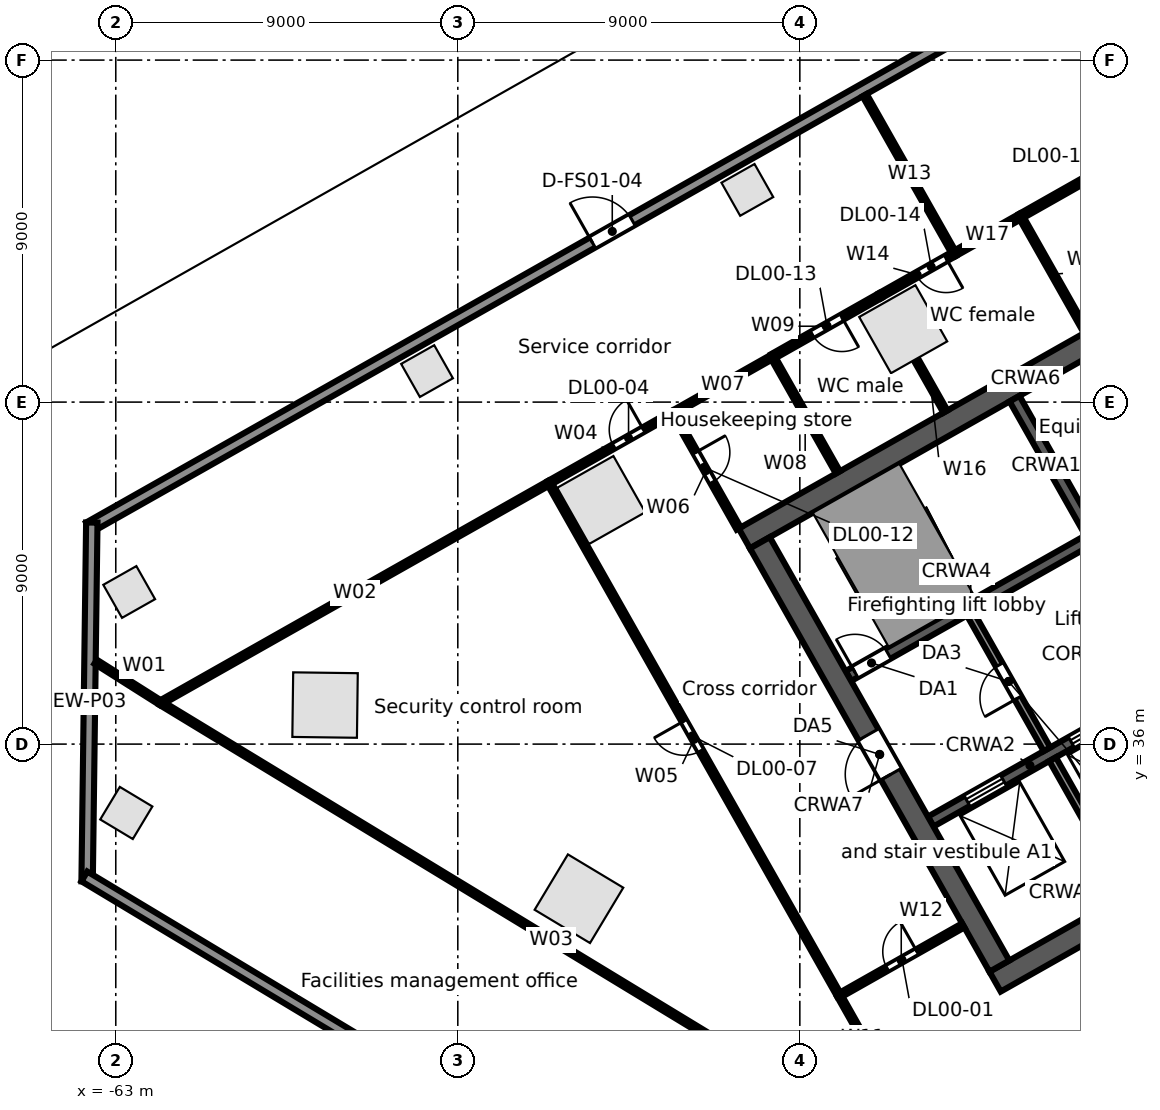
"""IFC4 building model, lengths in metres.
Left out: names, types, materials, properties, quantities, classifications, styles, units other than length and angle.
Written with IfcOpenShell. Run it as: python <this file> out.ifc"""

import sys

from ifc_helpers import new_model, si_unit, direction, frame, frame_2d, origin, origin_2d, place, context, subcontext, project, spatial, rectangle, extrude, element, fill, save


model = new_model("IFC4")
c1 = context("Model", 3, precision=1e-05, world=origin(), true_north=direction((0.0, 1.0)))
c2 = subcontext(c1, "Body", "Model", "MODEL_VIEW")
j1 = project(units=[si_unit("LENGTHUNIT", "METRE"), si_unit("PLANEANGLEUNIT", "RADIAN")], contexts=[c1])
p1 = place(None, origin())
s1 = spatial("IfcSite", under=j1, at=p1, CompositionType="ELEMENT")
p2 = place(p1, origin())
s2 = spatial("IfcBuilding", under=s1, at=p2, CompositionType="ELEMENT")
p3 = place(p2, origin())
s3 = spatial("IfcBuildingStorey", under=s2, at=p3, CompositionType="ELEMENT", Elevation=0.0)
for number, where, z_axis, x_axis in (
    (1, (-42.28, 46.919, 0.0), (0.0, 0.0, 1.0), (-0.87, -0.492, 0.0)),
    (2, (-50.226, 42.423, 0.0), (0.0, 0.0, 1.0), (-0.87, -0.492, 0.0)),
    (3, (-57.493, 37.027, 0.0), (0.0, 0.0, 1.0), (-0.013, -1.0, 0.0)),
    (4, (-50.812, 31.931, 0.0), (0.0, 0.0, 1.0), (0.857, -0.515, 0.0)),
):
    element("IfcColumn", number, at=place(p3, frame(where, z_axis=z_axis, x_axis=x_axis)), inside=s3, PredefinedType="COLUMN", context=c2, shape_type="SweptSolid", body=[
        extrude(rectangle(XDim=1.7, YDim=1.7, at=origin_2d()), origin(), (0.0, 0.0, 1.0), 6.5),
    ])
for number, where, z_axis, x_axis in (
    (5, (-46.381, 50.584, 0.0), (0.0, 0.0, 1.0), (-0.87, -0.492, 0.0)),
    (6, (-54.81, 45.816, 0.0), (0.0, 0.0, 1.0), (-0.87, -0.492, 0.0)),
    (7, (-62.647, 40.003, 0.0), (0.0, 0.0, 1.0), (-0.87, -0.492, 0.0)),
    (8, (-62.723, 34.188, 0.0), (0.0, 0.0, 1.0), (0.857, -0.515, 0.0)),
):
    element("IfcColumn", number, at=place(p3, frame(where, z_axis=z_axis, x_axis=x_axis)), inside=s3, PredefinedType="COLUMN", context=c2, shape_type="SweptSolid", body=[
        extrude(rectangle(XDim=1.0, YDim=1.0, at=origin_2d()), origin(), (0.0, 0.0, 1.0), 6.5),
    ])
p4 = place(p3, frame((-63.707, 41.701, 0.0), z_axis=(0.0, 0.0, 1.0), x_axis=(0.870355510268, 0.492423888277, 0.0)))
e9 = element("IfcWall", 9, at=p4, inside=s3, PredefinedType="STANDARD", context=c2, shape_type="SweptSolid", body=[
    extrude(rectangle(XDim=67.903, YDim=0.3, at=frame_2d((33.952, 0.0))), origin(), (0.0, 0.0, 1.0), 6.15),
])
p5 = place(p4, frame((44.274, 0.0, 0.0)))
e10 = element("IfcOpeningElement", 10, at=p5, cuts=e9, PredefinedType="OPENING", context=c2, shape_type="SweptSolid", body=[
    extrude(rectangle(XDim=1.2, YDim=2.4, at=frame_2d((0.6, 1.2))), frame((0.0, 0.16, 0.0), z_axis=(0.0, -1.0, 0.0), x_axis=(1.0, 0.0, 0.0)), (0.0, 0.0, 1.0), 0.32),
])
p6 = place(p4, frame((15.222, 0.0, 0.0)))
e11 = element("IfcOpeningElement", 11, at=p6, cuts=e9, PredefinedType="OPENING", context=c2, shape_type="SweptSolid", body=[
    extrude(rectangle(XDim=1.2, YDim=2.4, at=frame_2d((0.6, 1.2))), frame((0.0, 0.16, 0.0), z_axis=(0.0, -1.0, 0.0), x_axis=(1.0, 0.0, 0.0)), (0.0, 0.0, 1.0), 0.32),
])
p7 = place(p3, frame((-63.754, 32.387, 0.0), z_axis=(0.0, 0.0, 1.0), x_axis=(0.013081929375, 0.999914427901, 0.0)))
e12 = element("IfcWall", 12, at=p7, inside=s3, PredefinedType="STANDARD", context=c2, shape_type="SweptSolid", body=[
    extrude(rectangle(XDim=9.443, YDim=0.3, at=frame_2d((4.722, 0.0))), origin(), (0.0, 0.0, 1.0), 6.15),
])
p8 = place(p3, frame((-45.526, 21.522, 0.0), z_axis=(0.0, 0.0, 1.0), x_axis=(-0.857164837164, 0.515042174903, 0.0)))
e13 = element("IfcWall", 13, at=p8, inside=s3, PredefinedType="STANDARD", context=c2, shape_type="SweptSolid", body=[
    extrude(rectangle(XDim=21.35, YDim=0.3, at=frame_2d((10.675, 0.0))), origin(), (0.0, 0.0, 1.0), 6.15),
])
p9 = place(p3, frame((-39.862, 29.749, 0.0), z_axis=(0.0, 0.0, 1.0), x_axis=(0.870350116061, 0.492433422375, 0.0)))
e14 = element("IfcWall", 14, at=p9, inside=s3, PredefinedType="SOLIDWALL", context=c2, shape_type="SweptSolid", body=[
    extrude(rectangle(XDim=17.0, YDim=0.6, at=frame_2d((8.5, 0.0))), origin(), (0.0, 0.0, 1.0), 6.15),
])
p10 = place(p9, frame((7.2, 0.0, 0.0)))
e15 = element("IfcOpeningElement", 15, at=p10, cuts=e14, PredefinedType="OPENING", context=c2, shape_type="SweptSolid", body=[
    extrude(rectangle(XDim=1.2, YDim=2.1, at=frame_2d((0.6, 1.05))), frame((0.0, 0.31, 0.0), z_axis=(0.0, -1.0, 0.0), x_axis=(1.0, 0.0, 0.0)), (0.0, 0.0, 1.0), 0.62),
])
p11 = place(p3, frame((-41.556, 33.961, 0.0), z_axis=(0.0, 0.0, 1.0), x_axis=(0.870343731308, 0.492444706919, 0.0)))
e16 = element("IfcWall", 16, at=p11, inside=s3, PredefinedType="SOLIDWALL", context=c2, shape_type="SweptSolid", body=[
    extrude(rectangle(XDim=6.0, YDim=0.3, at=frame_2d((3.0, 0.0))), origin(), (0.0, 0.0, 1.0), 6.15),
])
p12 = place(p11, frame((1.1, 0.0, 0.0)))
e17 = element("IfcOpeningElement", 17, at=p12, cuts=e16, PredefinedType="OPENING", context=c2, shape_type="SweptSolid", body=[
    extrude(rectangle(XDim=1.1, YDim=2.1, at=frame_2d((0.55, 1.05))), frame((0.0, 0.16, 0.0), z_axis=(0.0, -1.0, 0.0), x_axis=(1.0, 0.0, 0.0)), (0.0, 0.0, 1.0), 0.32),
])
p13 = place(p11, frame((4.25, 0.0, 0.0)))
e18 = element("IfcOpeningElement", 18, at=p13, cuts=e16, PredefinedType="OPENING", context=c2, shape_type="SweptSolid", body=[
    extrude(rectangle(XDim=1.1, YDim=2.1, at=frame_2d((0.55, 1.05))), frame((0.0, 0.16, 0.0), z_axis=(0.0, -1.0, 0.0), x_axis=(1.0, 0.0, 0.0)), (0.0, 0.0, 1.0), 0.32),
])
p14 = place(p3, frame((-43.723, 37.791, 0.0), z_axis=(0.0, 0.0, 1.0), x_axis=(0.87035077051, 0.49243226567, 0.0)))
e19 = element("IfcWall", 19, at=p14, inside=s3, PredefinedType="SOLIDWALL", context=c2, shape_type="SweptSolid", body=[
    extrude(rectangle(XDim=7.4, YDim=0.3, at=frame_2d((3.7, 0.0))), origin(), (0.0, 0.0, 1.0), 6.15),
])
p15 = place(p14, frame((0.2, 0.0, 0.0)))
e20 = element("IfcOpeningElement", 20, at=p15, cuts=e19, PredefinedType="OPENING", context=c2, shape_type="SweptSolid", body=[
    extrude(rectangle(XDim=1.0, YDim=2.1, at=frame_2d((0.5, 1.05))), frame((0.0, 0.16, 0.0), z_axis=(0.0, -1.0, 0.0), x_axis=(1.0, 0.0, 0.0)), (0.0, 0.0, 1.0), 0.32),
])
p16 = place(p3, frame((-46.461, 41.412, 0.0), z_axis=(0.0, 0.0, 1.0), x_axis=(0.870350116061, 0.492433422375, 0.0)))
e21 = element("IfcWall", 21, at=p16, inside=s3, PredefinedType="SOLIDWALL", context=c2, shape_type="SweptSolid", body=[
    extrude(rectangle(XDim=17.0, YDim=0.6, at=frame_2d((8.5, 0.0))), origin(), (0.0, 0.0, 1.0), 6.15),
])
p17 = place(p3, frame((-46.052, 41.298, 0.0), z_axis=(0.0, 0.0, 1.0), x_axis=(0.492418598281, -0.870358503186, 0.0)))
e22 = element("IfcWall", 22, at=p17, inside=s3, PredefinedType="SOLIDWALL", context=c2, shape_type="SweptSolid", body=[
    extrude(rectangle(XDim=12.8, YDim=0.6, at=frame_2d((6.4, 0.0))), origin(), (0.0, 0.0, 1.0), 6.15),
])
p18 = place(p17, frame((5.8, 0.0, 0.0)))
e23 = element("IfcOpeningElement", 23, at=p18, cuts=e22, PredefinedType="OPENING", context=c2, shape_type="SweptSolid", body=[
    extrude(rectangle(XDim=1.2, YDim=2.1, at=frame_2d((0.6, 1.05))), frame((0.0, 0.31, 0.0), z_axis=(0.0, -1.0, 0.0), x_axis=(1.0, 0.0, 0.0)), (0.0, 0.0, 1.0), 0.62),
])
p19 = place(p3, frame((-38.349, 35.603, 0.0), z_axis=(0.0, 0.0, 1.0), x_axis=(0.49241474071, -0.870360685654, 0.0)))
e24 = element("IfcWall", 24, at=p19, inside=s3, PredefinedType="SOLIDWALL", context=c2, shape_type="SweptSolid", body=[
    extrude(rectangle(XDim=4.05, YDim=0.2, at=frame_2d((2.025, 0.0))), origin(), (0.0, 0.0, 1.0), 6.15),
])
p20 = place(p3, frame((-40.516, 39.433, 0.0), z_axis=(0.0, 0.0, 1.0), x_axis=(0.492453559952, -0.87033872216, 0.0)))
e25 = element("IfcWall", 25, at=p20, inside=s3, PredefinedType="PARTITIONING", context=c2, shape_type="SweptSolid", body=[
    extrude(rectangle(XDim=4.1, YDim=0.2, at=frame_2d((2.05, 0.0))), origin(), (0.0, 0.0, 1.0), 6.15),
])
p21 = place(p20, frame((1.55, 0.0, 0.0)))
e26 = element("IfcOpeningElement", 26, at=p21, cuts=e25, PredefinedType="OPENING", context=c2, shape_type="SweptSolid", body=[
    extrude(rectangle(XDim=1.0, YDim=2.1, at=frame_2d((0.5, 1.05))), frame((0.0, 0.11, 0.0), z_axis=(0.0, -1.0, 0.0), x_axis=(1.0, 0.0, 0.0)), (0.0, 0.0, 1.0), 0.22),
])
p22 = place(p3, frame((-39.35, 45.09, 0.0), z_axis=(0.0, 0.0, 1.0), x_axis=(0.49241474071, -0.870360685654, 0.0)))
e27 = element("IfcWall", 27, at=p22, inside=s3, PredefinedType="SOLIDWALL", context=c2, shape_type="SweptSolid", body=[
    extrude(rectangle(XDim=4.05, YDim=0.3, at=frame_2d((2.025, 0.0))), origin(), (0.0, 0.0, 1.0), 6.15),
])
p23 = place(p3, frame((-63.529, 38.167, 0.0), z_axis=(0.0, 0.0, 1.0), x_axis=(0.844913795328, -0.534902494352, 0.0)))
e28 = element("IfcWall", 28, at=p23, inside=s3, PredefinedType="PARTITIONING", context=c2, shape_type="SweptSolid", body=[
    extrude(rectangle(XDim=2.019, YDim=0.125, at=frame_2d((1.01, 0.0))), origin(), (0.0, 0.0, 1.0), 5.63),
])
p24 = place(p3, frame((-61.823, 37.087, 0.0), z_axis=(0.0, 0.0, 1.0), x_axis=(0.870357669928, 0.492420071074, 0.0)))
e29 = element("IfcWall", 29, at=p24, inside=s3, PredefinedType="PARTITIONING", context=c2, shape_type="SweptSolid", body=[
    extrude(rectangle(XDim=11.75, YDim=0.125, at=frame_2d((5.875, 0.0))), origin(), (0.0, 0.0, 1.0), 5.33),
])
p25 = place(p3, frame((-61.823, 37.087, 0.0), z_axis=(0.0, 0.0, 1.0), x_axis=(0.854710834679, -0.519104410579, 0.0)))
e30 = element("IfcWall", 30, at=p25, inside=s3, PredefinedType="PARTITIONING", context=c2, shape_type="SweptSolid", body=[
    extrude(rectangle(XDim=24.064, YDim=0.125, at=frame_2d((12.032, 0.0))), origin(), (0.0, 0.0, 1.0), 5.212),
])
p26 = place(p3, frame((-51.596, 42.873, 0.0), z_axis=(0.0, 0.0, 1.0), x_axis=(0.87043427122, 0.492284652905, 0.0)))
e31 = element("IfcWall", 31, at=p26, inside=s3, PredefinedType="PARTITIONING", context=c2, shape_type="SweptSolid", body=[
    extrude(rectangle(XDim=3.75, YDim=0.125, at=frame_2d((1.875, 0.0))), origin(), (0.0, 0.0, 1.0), 6.15),
])
p27 = place(p26, frame((1.95, 0.0, 0.0)))
e32 = element("IfcOpeningElement", 32, at=p27, cuts=e31, PredefinedType="OPENING", context=c2, shape_type="SweptSolid", body=[
    extrude(rectangle(XDim=0.9, YDim=2.1, at=frame_2d((0.45, 1.05))), frame((0.0, 0.073, 0.0), z_axis=(0.0, -1.0, 0.0), x_axis=(1.0, 0.0, 0.0)), (0.0, 0.0, 1.0), 0.145),
])
p28 = place(p3, frame((-51.596, 42.873, 0.0), z_axis=(0.0, 0.0, 1.0), x_axis=(0.492435038471, -0.870349201692, 0.0)))
e33 = element("IfcWall", 33, at=p28, inside=s3, PredefinedType="PARTITIONING", context=c2, shape_type="SweptSolid", body=[
    extrude(rectangle(XDim=15.501, YDim=0.125, at=frame_2d((7.75, 0.0))), origin(), (0.0, 0.0, 1.0), 5.212),
])
p29 = place(p28, frame((7.2, 0.0, 0.0)))
e34 = element("IfcOpeningElement", 34, at=p29, cuts=e33, PredefinedType="OPENING", context=c2, shape_type="SweptSolid", body=[
    extrude(rectangle(XDim=0.9, YDim=2.1, at=frame_2d((0.45, 1.05))), frame((0.0, 0.073, 0.0), z_axis=(0.0, -1.0, 0.0), x_axis=(1.0, 0.0, 0.0)), (0.0, 0.0, 1.0), 0.145),
])
p30 = place(p3, frame((-48.332, 44.719, 0.0), z_axis=(0.0, 0.0, 1.0), x_axis=(0.492392845909, -0.87037307248, 0.0)))
e35 = element("IfcWall", 35, at=p30, inside=s3, PredefinedType="PARTITIONING", context=c2, shape_type="SweptSolid", body=[
    extrude(rectangle(XDim=3.5, YDim=0.125, at=frame_2d((1.75, 0.0))), origin(), (0.0, 0.0, 1.0), 5.43),
])
p31 = place(p30, frame((1.2, 0.0, 0.0)))
e36 = element("IfcOpeningElement", 36, at=p31, cuts=e35, PredefinedType="OPENING", context=c2, shape_type="SweptSolid", body=[
    extrude(rectangle(XDim=0.9, YDim=2.1, at=frame_2d((0.45, 1.05))), frame((0.0, 0.073, 0.0), z_axis=(0.0, -1.0, 0.0), x_axis=(1.0, 0.0, 0.0)), (0.0, 0.0, 1.0), 0.145),
])
p32 = place(p3, frame((-48.332, 44.719, 0.0), z_axis=(0.0, 0.0, 1.0), x_axis=(0.870388475779, 0.492365617434, 0.0)))
e37 = element("IfcWall", 37, at=p32, inside=s3, PredefinedType="PARTITIONING", context=c2, shape_type="SweptSolid", body=[
    extrude(rectangle(XDim=3.0, YDim=0.125, at=frame_2d((1.5, 0.0))), origin(), (0.0, 0.0, 1.0), 6.15),
])
p33 = place(p3, frame((-45.721, 46.196, 0.0), z_axis=(0.0, 0.0, 1.0), x_axis=(0.492310098002, -0.870419879946, 0.0)))
e38 = element("IfcWall", 38, at=p33, inside=s3, PredefinedType="PARTITIONING", context=c2, shape_type="SweptSolid", body=[
    extrude(rectangle(XDim=3.5, YDim=0.125, at=frame_2d((1.75, 0.0))), origin(), (0.0, 0.0, 1.0), 5.43),
])
p34 = place(p3, frame((-45.721, 46.196, 0.0), z_axis=(0.0, 0.0, 1.0), x_axis=(0.870278724491, 0.492559581877, 0.0)))
e39 = element("IfcWall", 39, at=p34, inside=s3, PredefinedType="PARTITIONING", context=c2, shape_type="SweptSolid", body=[
    extrude(rectangle(XDim=3.25, YDim=0.15, at=frame_2d((1.625, 0.0))), origin(), (0.0, 0.0, 1.0), 5.53),
])
p35 = place(p34, frame((1.2, 0.0, 0.0)))
e40 = element("IfcOpeningElement", 40, at=p35, cuts=e39, PredefinedType="OPENING", context=c2, shape_type="SweptSolid", body=[
    extrude(rectangle(XDim=0.9, YDim=2.1, at=frame_2d((0.45, 1.05))), frame((0.0, 0.085, 0.0), z_axis=(0.0, -1.0, 0.0), x_axis=(1.0, 0.0, 0.0)), (0.0, 0.0, 1.0), 0.17),
])
p36 = place(p3, frame((-43.963, 29.382, 0.0), z_axis=(0.0, 0.0, 1.0), x_axis=(0.492408705769, -0.870364099951, 0.0)))
e41 = element("IfcWall", 41, at=p36, inside=s3, PredefinedType="PARTITIONING", context=c2, shape_type="SweptSolid", body=[
    extrude(rectangle(XDim=2.541, YDim=0.125, at=frame_2d((1.27, 0.0))), origin(), (0.0, 0.0, 1.0), 5.43),
])
p37 = place(p3, frame((-43.963, 29.382, 0.0), z_axis=(0.0, 0.0, 1.0), x_axis=(0.870259488443, 0.492593567533, 0.0)))
e42 = element("IfcWall", 42, at=p37, inside=s3, PredefinedType="PARTITIONING", context=c2, shape_type="SweptSolid", body=[
    extrude(rectangle(XDim=3.749, YDim=0.125, at=frame_2d((1.875, 0.0))), origin(), (0.0, 0.0, 1.0), 5.524),
])
p38 = place(p37, frame((1.45, 0.0, 0.0)))
e43 = element("IfcOpeningElement", 43, at=p38, cuts=e42, PredefinedType="OPENING", context=c2, shape_type="SweptSolid", body=[
    extrude(rectangle(XDim=0.9, YDim=2.1, at=frame_2d((0.45, 1.05))), frame((0.0, 0.073, 0.0), z_axis=(0.0, -1.0, 0.0), x_axis=(1.0, 0.0, 0.0)), (0.0, 0.0, 1.0), 0.145),
])
p39 = place(p3, frame((-43.295, 53.077, 0.0), z_axis=(0.0, 0.0, 1.0), x_axis=(0.492503605136, -0.87031040378, 0.0)))
e44 = element("IfcWall", 44, at=p39, inside=s3, PredefinedType="PARTITIONING", context=c2, shape_type="SweptSolid", body=[
    extrude(rectangle(XDim=4.793, YDim=0.125, at=frame_2d((2.397, 0.0))), origin(), (0.0, 0.0, 1.0), 5.43),
])
p40 = place(p3, frame((-42.892, 47.797, 0.0), z_axis=(0.0, 0.0, 1.0), x_axis=(0.870332332106, 0.492464853254, 0.0)))
e45 = element("IfcWall", 45, at=p40, inside=s3, PredefinedType="PARTITIONING", context=c2, shape_type="SweptSolid", body=[
    extrude(rectangle(XDim=2.25, YDim=0.15, at=frame_2d((1.125, 0.0))), origin(), (0.0, 0.0, 1.0), 6.15),
])
p41 = place(p40, frame((1.1, 0.0, 0.0)))
e46 = element("IfcOpeningElement", 46, at=p41, cuts=e45, PredefinedType="OPENING", context=c2, shape_type="SweptSolid", body=[
    extrude(rectangle(XDim=0.9, YDim=2.1, at=frame_2d((0.45, 1.05))), frame((0.0, 0.085, 0.0), z_axis=(0.0, -1.0, 0.0), x_axis=(1.0, 0.0, 0.0)), (0.0, 0.0, 1.0), 0.17),
])
p42 = place(p3, frame((-41.949, 46.129, 0.0), z_axis=(0.0, 0.0, 1.0), x_axis=(0.492366981934, -0.870387703901, 0.0)))
e47 = element("IfcWall", 47, at=p42, inside=s3, PredefinedType="PARTITIONING", context=c2, shape_type="SweptSolid", body=[
    extrude(rectangle(XDim=1.584, YDim=0.125, at=frame_2d((0.792, 0.0))), origin(), (0.0, 0.0, 1.0), 5.73),
])
p43 = place(p3, frame((-40.934, 48.905, 0.0), z_axis=(0.0, 0.0, 1.0), x_axis=(0.870592396556, 0.492004958368, 0.0)))
e48 = element("IfcWall", 48, at=p43, inside=s3, PredefinedType="PARTITIONING", context=c2, shape_type="SweptSolid", body=[
    extrude(rectangle(XDim=2.0, YDim=0.15, at=frame_2d((1.0, 0.0))), origin(), (0.0, 0.0, 1.0), 6.15),
])
p44 = place(p3, frame((-39.193, 49.889, 0.0), z_axis=(0.0, 0.0, 1.0), x_axis=(0.492392845909, -0.87037307248, 0.0)))
e49 = element("IfcWall", 49, at=p44, inside=s3, PredefinedType="PARTITIONING", context=c2, shape_type="SweptSolid", body=[
    extrude(rectangle(XDim=3.5, YDim=0.125, at=frame_2d((1.75, 0.0))), origin(), (0.0, 0.0, 1.0), 5.43),
])
p45 = place(p3, frame((-39.193, 49.889, 0.0), z_axis=(0.0, 0.0, 1.0), x_axis=(0.870324897112, 0.492477992876, 0.0)))
e50 = element("IfcWall", 50, at=p45, inside=s3, PredefinedType="PARTITIONING", context=c2, shape_type="SweptSolid", body=[
    extrude(rectangle(XDim=6.5, YDim=0.15, at=frame_2d((3.25, 0.0))), origin(), (0.0, 0.0, 1.0), 5.53),
])
p46 = place(p45, frame((2.7, 0.0, 0.0)))
e51 = element("IfcOpeningElement", 51, at=p46, cuts=e50, PredefinedType="OPENING", context=c2, shape_type="SweptSolid", body=[
    extrude(rectangle(XDim=0.9, YDim=2.1, at=frame_2d((0.45, 1.05))), frame((0.0, 0.085, 0.0), z_axis=(0.0, -1.0, 0.0), x_axis=(1.0, 0.0, 0.0)), (0.0, 0.0, 1.0), 0.17),
])
p47 = place(p6, origin())
e52 = element("IfcDoor", 52, at=p47, inside=s3, OperationType="SINGLE_SWING_LEFT", PredefinedType="DOOR", context=c2, shape_type="SweptSolid", body=[
    extrude(rectangle(XDim=1.2, YDim=2.4, at=frame_2d((0.6, 1.2))), frame((0.0, 0.025, 0.0), z_axis=(0.0, -1.0, 0.0), x_axis=(1.0, 0.0, 0.0)), (0.0, 0.0, 1.0), 0.05),
])
fill(e11, e52)
p48 = place(p12, origin())
e53 = element("IfcDoor", 53, at=p48, inside=s3, OperationType="DOUBLE_DOOR_SLIDING", PredefinedType="DOOR", context=c2, shape_type="SweptSolid", body=[
    extrude(rectangle(XDim=1.1, YDim=2.1, at=frame_2d((0.55, 1.05))), frame((0.0, 0.025, 0.0), z_axis=(0.0, -1.0, 0.0), x_axis=(1.0, 0.0, 0.0)), (0.0, 0.0, 1.0), 0.05),
])
fill(e17, e53)
p49 = place(p13, origin())
e54 = element("IfcDoor", 54, at=p49, inside=s3, OperationType="DOUBLE_DOOR_SLIDING", PredefinedType="DOOR", context=c2, shape_type="SweptSolid", body=[
    extrude(rectangle(XDim=1.1, YDim=2.1, at=frame_2d((0.55, 1.05))), frame((0.0, 0.025, 0.0), z_axis=(0.0, -1.0, 0.0), x_axis=(1.0, 0.0, 0.0)), (0.0, 0.0, 1.0), 0.05),
])
fill(e18, e54)
p50 = place(p15, origin())
e55 = element("IfcDoor", 55, at=p50, inside=s3, OperationType="SINGLE_SWING_LEFT", PredefinedType="DOOR", context=c2, shape_type="SweptSolid", body=[
    extrude(rectangle(XDim=1.0, YDim=2.1, at=frame_2d((0.5, 1.05))), frame((0.0, 0.025, 0.0), z_axis=(0.0, -1.0, 0.0), x_axis=(1.0, 0.0, 0.0)), (0.0, 0.0, 1.0), 0.05),
])
fill(e20, e55)
p51 = place(p21, frame((1.0, 0.0, 0.0), z_axis=(0.0, 0.0, 1.0), x_axis=(-1.0, 0.0, 0.0)))
e56 = element("IfcDoor", 56, at=p51, inside=s3, OperationType="SINGLE_SWING_LEFT", PredefinedType="DOOR", context=c2, shape_type="SweptSolid", body=[
    extrude(rectangle(XDim=1.0, YDim=2.1, at=frame_2d((0.5, 1.05))), frame((0.0, 0.025, 0.0), z_axis=(0.0, -1.0, 0.0), x_axis=(1.0, 0.0, 0.0)), (0.0, 0.0, 1.0), 0.05),
])
fill(e26, e56)
p52 = place(p18, frame((1.2, 0.0, 0.0), z_axis=(0.0, 0.0, 1.0), x_axis=(-1.0, 0.0, 0.0)))
e57 = element("IfcDoor", 57, at=p52, inside=s3, OperationType="SINGLE_SWING_LEFT", PredefinedType="DOOR", context=c2, shape_type="SweptSolid", body=[
    extrude(rectangle(XDim=1.2, YDim=2.1, at=frame_2d((0.6, 1.05))), frame((0.0, 0.025, 0.0), z_axis=(0.0, -1.0, 0.0), x_axis=(1.0, 0.0, 0.0)), (0.0, 0.0, 1.0), 0.05),
])
fill(e23, e57)
p53 = place(p38, origin())
e58 = element("IfcDoor", 58, at=p53, inside=s3, OperationType="SINGLE_SWING_RIGHT", PredefinedType="DOOR", context=c2, shape_type="SweptSolid", body=[
    extrude(rectangle(XDim=0.9, YDim=2.1, at=frame_2d((0.45, 1.05))), frame((0.0, 0.025, 0.0), z_axis=(0.0, -1.0, 0.0), x_axis=(1.0, 0.0, 0.0)), (0.0, 0.0, 1.0), 0.05),
])
fill(e43, e58)
p54 = place(p27, origin())
e59 = element("IfcDoor", 59, at=p54, inside=s3, OperationType="SINGLE_SWING_RIGHT", PredefinedType="DOOR", context=c2, shape_type="SweptSolid", body=[
    extrude(rectangle(XDim=0.9, YDim=2.1, at=frame_2d((0.45, 1.05))), frame((0.0, 0.025, 0.0), z_axis=(0.0, -1.0, 0.0), x_axis=(1.0, 0.0, 0.0)), (0.0, 0.0, 1.0), 0.05),
])
fill(e32, e59)
p55 = place(p29, frame((0.9, 0.0, 0.0), z_axis=(0.0, 0.0, 1.0), x_axis=(-1.0, 0.0, 0.0)))
e60 = element("IfcDoor", 60, at=p55, inside=s3, OperationType="SINGLE_SWING_RIGHT", PredefinedType="DOOR", context=c2, shape_type="SweptSolid", body=[
    extrude(rectangle(XDim=0.9, YDim=2.1, at=frame_2d((0.45, 1.05))), frame((0.0, 0.025, 0.0), z_axis=(0.0, -1.0, 0.0), x_axis=(1.0, 0.0, 0.0)), (0.0, 0.0, 1.0), 0.05),
])
fill(e34, e60)
p56 = place(p31, origin())
e61 = element("IfcDoor", 61, at=p56, inside=s3, OperationType="SINGLE_SWING_LEFT", PredefinedType="DOOR", context=c2, shape_type="SweptSolid", body=[
    extrude(rectangle(XDim=0.9, YDim=2.1, at=frame_2d((0.45, 1.05))), frame((0.0, 0.025, 0.0), z_axis=(0.0, -1.0, 0.0), x_axis=(1.0, 0.0, 0.0)), (0.0, 0.0, 1.0), 0.05),
])
fill(e36, e61)
p57 = place(p35, frame((0.9, 0.0, 0.0), z_axis=(0.0, 0.0, 1.0), x_axis=(-1.0, 0.0, 0.0)))
e62 = element("IfcDoor", 62, at=p57, inside=s3, OperationType="SINGLE_SWING_LEFT", PredefinedType="DOOR", context=c2, shape_type="SweptSolid", body=[
    extrude(rectangle(XDim=0.9, YDim=2.1, at=frame_2d((0.45, 1.05))), frame((0.0, 0.025, 0.0), z_axis=(0.0, -1.0, 0.0), x_axis=(1.0, 0.0, 0.0)), (0.0, 0.0, 1.0), 0.05),
])
fill(e40, e62)
p58 = place(p41, frame((0.9, 0.0, 0.0), z_axis=(0.0, 0.0, 1.0), x_axis=(-1.0, 0.0, 0.0)))
e63 = element("IfcDoor", 63, at=p58, inside=s3, OperationType="SINGLE_SWING_LEFT", PredefinedType="DOOR", context=c2, shape_type="SweptSolid", body=[
    extrude(rectangle(XDim=0.9, YDim=2.1, at=frame_2d((0.45, 1.05))), frame((0.0, 0.025, 0.0), z_axis=(0.0, -1.0, 0.0), x_axis=(1.0, 0.0, 0.0)), (0.0, 0.0, 1.0), 0.05),
])
fill(e46, e63)
save(model, sys.argv[1])
